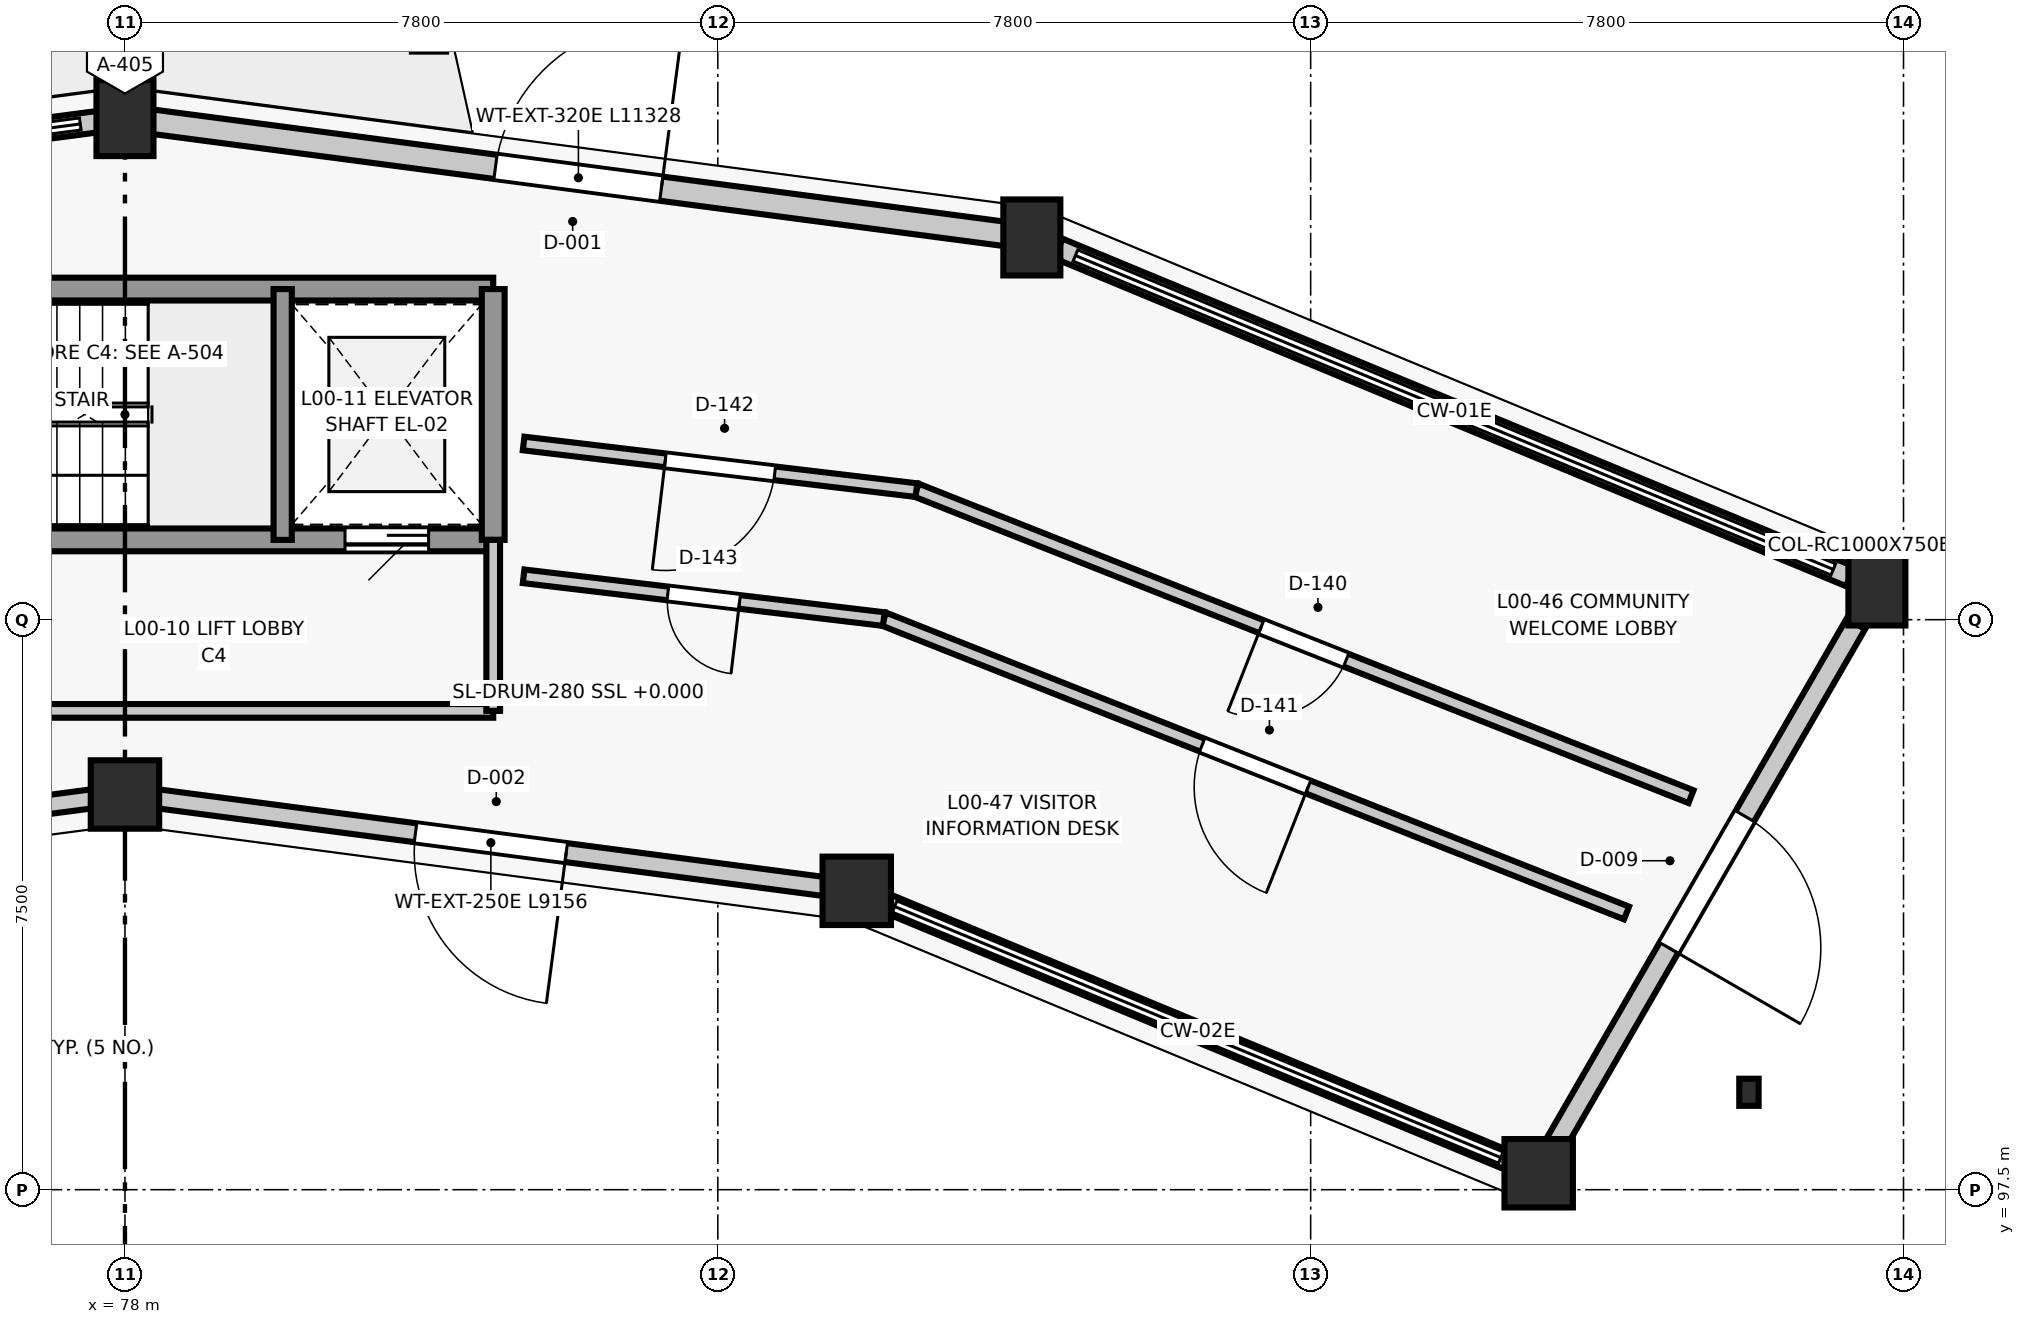
"""IFC4 building model, lengths in metres.
Left out: names, types, materials, properties, quantities, classifications, styles, units other than length and angle.
Written with IfcOpenShell. Run it as: python <this file> out.ifc"""

import sys

from ifc_helpers import new_model, si_unit, direction, frame, frame_2d, origin, origin_2d, place, context, subcontext, project, spatial, rectangle, circle, i_section, extrude, element, fill, save


model = new_model("IFC4")
c1 = context("Model", 3, precision=1e-05, world=origin(), true_north=direction((0.0, 1.0)))
c2 = subcontext(c1, "Body", "Model", "MODEL_VIEW")
j1 = project(units=[si_unit("LENGTHUNIT", "METRE"), si_unit("PLANEANGLEUNIT", "RADIAN")], contexts=[c1])
p1 = place(None, origin())
s1 = spatial("IfcSite", under=j1, at=p1, CompositionType="ELEMENT")
p2 = place(p1, origin())
s2 = spatial("IfcBuilding", under=s1, at=p2, CompositionType="ELEMENT")
p3 = place(p2, origin())
s3 = spatial("IfcBuildingStorey", under=s2, at=p3, CompositionType="ELEMENT", Elevation=0.0)
for number, where, z_axis, x_axis in (
    (1, (96.6, 97.716, 0.0), (0.0, 0.0, 1.0), (1.0, 0.0, 0.0)),
    (2, (87.628, 101.432, 0.0), (0.0, 0.0, 1.0), (1.0, 0.0, 0.0)),
    (3, (78.0, 102.7, 0.0), (0.0, 0.0, 1.0), (1.0, 0.0, 0.0)),
):
    element("IfcColumn", number, at=place(p3, frame(where, z_axis=z_axis, x_axis=x_axis)), inside=s3, PredefinedType="COLUMN", context=c2, shape_type="SweptSolid", body=[
        extrude(circle(Radius=0.45, at=origin_2d()), origin(), (0.0, 0.0, 1.0), 4.5),
    ])
for number, where, z_axis, x_axis in (
    (4, (101.05, 105.424, 0.0), (0.0, 0.0, 1.0), (1.0, 0.0, 0.0)),
    (5, (89.932, 110.029, 0.0), (0.0, 0.0, 1.0), (1.0, 0.0, 0.0)),
    (6, (78.0, 111.6, 0.0), (0.0, 0.0, 1.0), (1.0, 0.0, 0.0)),
):
    element("IfcColumn", number, at=place(p3, frame(where, z_axis=z_axis, x_axis=x_axis)), inside=s3, PredefinedType="COLUMN", context=c2, shape_type="SweptSolid", body=[
        extrude(rectangle(XDim=0.75, YDim=1.0, at=origin_2d()), origin(), (0.0, 0.0, 1.0), 4.5),
    ])
p4 = place(p3, frame((99.366, 98.782, 0.0), z_axis=(0.0, 0.0, 1.0), x_axis=(1.0, 0.0, 0.0)))
e7 = element("IfcColumn", 7, at=p4, inside=s3, PredefinedType="COLUMN", context=c2, shape_type="SweptSolid", body=[
    extrude(i_section(OverallWidth=0.255, OverallDepth=0.357, WebThickness=0.01, FlangeThickness=0.018, FilletRadius=0.015, at=origin_2d()), origin(), (0.0, 0.0, 1.0), 4.5),
])
p5 = place(p3, frame((90.283, 109.883, 0.0), z_axis=(0.0, 0.0, 1.0), x_axis=(0.923883530636, -0.382673779896, 0.0)))
e8 = element("IfcWall", 8, at=p5, inside=s3, PredefinedType="STANDARD", context=c2, shape_type="SweptSolid", body=[
    extrude(rectangle(XDim=11.272, YDim=0.28, at=frame_2d((5.636, 0.0))), origin(), (0.0, 0.0, 1.0), 0.82),
])
p6 = place(p3, frame((96.323, 97.831, 0.0), z_axis=(0.0, 0.0, 1.0), x_axis=(-0.923880324771, 0.382681519675, 0.0)))
e9 = element("IfcWall", 9, at=p6, inside=s3, PredefinedType="STANDARD", context=c2, shape_type="SweptSolid", body=[
    extrude(rectangle(XDim=9.112, YDim=0.25, at=frame_2d((4.556, 0.0))), origin(), (0.0, 0.0, 1.0), 0.82),
])
p7 = place(p3, frame((78.35, 111.554, 0.0), z_axis=(0.0, 0.0, 1.0), x_axis=(0.991443215359, -0.130538694334, 0.0)))
e10 = element("IfcWall", 10, at=p7, inside=s3, PredefinedType="STANDARD", context=c2, shape_type="SweptSolid", body=[
    extrude(rectangle(XDim=11.328, YDim=0.32, at=frame_2d((5.664, 0.0))), origin(), (0.0, 0.0, 1.0), 3.466),
])
p8 = place(p7, frame((4.564, 0.0, 0.0)))
e11 = element("IfcOpeningElement", 11, at=p8, cuts=e10, PredefinedType="OPENING", context=c2, shape_type="SweptSolid", body=[
    extrude(rectangle(XDim=2.2, YDim=2.35, at=frame_2d((1.1, 1.175))), frame((0.0, 0.17, 0.0), z_axis=(0.0, -1.0, 0.0), x_axis=(1.0, 0.0, 0.0)), (0.0, 0.0, 1.0), 0.34),
])
p9 = place(p3, frame((87.353, 101.469, 0.0), z_axis=(0.0, 0.0, 1.0), x_axis=(-0.991441766434, 0.130549698469, 0.0)))
e12 = element("IfcWall", 12, at=p9, inside=s3, PredefinedType="STANDARD", context=c2, shape_type="SweptSolid", body=[
    extrude(rectangle(XDim=9.156, YDim=0.25, at=frame_2d((4.578, 0.0))), origin(), (0.0, 0.0, 1.0), 3.549),
])
p10 = place(p9, frame((3.578, 0.0, 0.0)))
e13 = element("IfcOpeningElement", 13, at=p10, cuts=e12, PredefinedType="OPENING", context=c2, shape_type="SweptSolid", body=[
    extrude(rectangle(XDim=2.0, YDim=2.3, at=frame_2d((1.0, 1.15))), frame((0.0, 0.135, 0.0), z_axis=(0.0, -1.0, 0.0), x_axis=(1.0, 0.0, 0.0)), (0.0, 0.0, 1.0), 0.27),
])
p11 = place(p3, frame((66.419, 110.075, 0.0), z_axis=(0.0, 0.0, 1.0), x_axis=(0.991443215359, 0.130538694334, 0.0)))
e14 = element("IfcWall", 14, at=p11, inside=s3, PredefinedType="STANDARD", context=c2, shape_type="SweptSolid", body=[
    extrude(rectangle(XDim=11.328, YDim=0.28, at=frame_2d((5.664, 0.0))), origin(), (0.0, 0.0, 1.0), 0.82),
])
p12 = place(p3, frame((77.725, 102.664, 0.0), z_axis=(0.0, 0.0, 1.0), x_axis=(-0.991441766434, -0.130549698469, 0.0)))
e15 = element("IfcWall", 15, at=p12, inside=s3, PredefinedType="STANDARD", context=c2, shape_type="SweptSolid", body=[
    extrude(rectangle(XDim=9.156, YDim=0.25, at=frame_2d((4.578, 0.0))), origin(), (0.0, 0.0, 1.0), 3.549),
])
p13 = place(p12, frame((4.128, 0.0, 0.85)))
e16 = element("IfcOpeningElement", 16, at=p13, cuts=e15, PredefinedType="OPENING", context=c2, shape_type="SweptSolid", body=[
    extrude(rectangle(XDim=0.9, YDim=0.9, at=frame_2d((0.45, 0.45))), frame((0.0, 0.135, 0.0), z_axis=(0.0, -1.0, 0.0), x_axis=(1.0, 0.0, 0.0)), (0.0, 0.0, 1.0), 0.27),
])
p14 = place(p3, frame((100.774, 104.946, 0.0), z_axis=(0.0, 0.0, 1.0), x_axis=(-0.499969958057, -0.866042747813, 0.0)))
e17 = element("IfcWall", 17, at=p14, inside=s3, PredefinedType="STANDARD", context=c2, shape_type="SweptSolid", body=[
    extrude(rectangle(XDim=8.026, YDim=0.28, at=frame_2d((4.013, 0.0))), origin(), (0.0, 0.0, 1.0), 3.495),
])
p15 = place(p14, frame((2.923, 0.0, 0.0)))
e18 = element("IfcOpeningElement", 18, at=p15, cuts=e17, PredefinedType="OPENING", context=c2, shape_type="SweptSolid", body=[
    extrude(rectangle(XDim=2.0, YDim=2.3, at=frame_2d((1.0, 1.15))), frame((0.0, 0.15, 0.0), z_axis=(0.0, -1.0, 0.0), x_axis=(1.0, 0.0, 0.0)), (0.0, 0.0, 1.0), 0.3),
])
p16 = place(p3, frame((82.845, 106.05, 0.0), z_axis=(0.0, 0.0, 1.0), x_axis=(-1.0, 0.0, 0.0)))
e19 = element("IfcWall", 19, at=p16, inside=s3, PredefinedType="SHEAR", context=c2, shape_type="SweptSolid", body=[
    extrude(rectangle(XDim=9.69, YDim=0.3, at=frame_2d((4.845, 0.0))), origin(), (0.0, 0.0, 1.0), 4.5),
])
p17 = place(p16, frame((8.17, 0.0, 0.0)))
e20 = element("IfcOpeningElement", 20, at=p17, cuts=e19, PredefinedType="OPENING", context=c2, shape_type="SweptSolid", body=[
    extrude(rectangle(XDim=1.3, YDim=2.15, at=frame_2d((0.65, 1.075))), frame((0.0, 0.16, 0.0), z_axis=(0.0, -1.0, 0.0), x_axis=(1.0, 0.0, 0.0)), (0.0, 0.0, 1.0), 0.32),
])
p18 = place(p16, frame((0.85, 0.0, 0.0)))
e21 = element("IfcOpeningElement", 21, at=p18, cuts=e19, PredefinedType="OPENING", context=c2, shape_type="SweptSolid", body=[
    extrude(rectangle(XDim=1.1, YDim=2.15, at=frame_2d((0.55, 1.075))), frame((0.0, 0.16, 0.0), z_axis=(0.0, -1.0, 0.0), x_axis=(1.0, 0.0, 0.0)), (0.0, 0.0, 1.0), 0.32),
])
p19 = place(p3, frame((73.155, 109.35, 0.0), z_axis=(0.0, 0.0, 1.0), x_axis=(1.0, 0.0, 0.0)))
e22 = element("IfcWall", 22, at=p19, inside=s3, PredefinedType="SHEAR", context=c2, shape_type="SweptSolid", body=[
    extrude(rectangle(XDim=9.69, YDim=0.3, at=frame_2d((4.845, 0.0))), origin(), (0.0, 0.0, 1.0), 4.5),
])
p20 = place(p3, frame((82.845, 109.35, 0.0), z_axis=(0.0, 0.0, 1.0), x_axis=(0.0, -1.0, 0.0)))
e23 = element("IfcWall", 23, at=p20, inside=s3, PredefinedType="SHEAR", context=c2, shape_type="SweptSolid", body=[
    extrude(rectangle(XDim=3.3, YDim=0.3, at=frame_2d((1.65, 0.0))), origin(), (0.0, 0.0, 1.0), 4.5),
])
p21 = place(p3, frame((80.075, 106.05, 0.0), z_axis=(0.0, 0.0, 1.0), x_axis=(0.0, 1.0, 0.0)))
e24 = element("IfcWall", 24, at=p21, inside=s3, PredefinedType="SHEAR", context=c2, shape_type="SweptSolid", body=[
    extrude(rectangle(XDim=3.3, YDim=0.24, at=frame_2d((1.65, 0.0))), origin(), (0.0, 0.0, 1.0), 4.5),
])
p22 = place(p3, frame((73.155, 103.8, 0.0), z_axis=(0.0, 0.0, 1.0), x_axis=(1.0, 0.0, 0.0)))
e25 = element("IfcWall", 25, at=p22, inside=s3, PredefinedType="PARTITIONING", context=c2, shape_type="SweptSolid", body=[
    extrude(rectangle(XDim=9.69, YDim=0.18, at=frame_2d((4.845, 0.0))), origin(), (0.0, 0.0, 1.0), 4.255),
])
p23 = place(p22, frame((1.1, 0.0, 0.0)))
e26 = element("IfcOpeningElement", 26, at=p23, cuts=e25, PredefinedType="OPENING", context=c2, shape_type="SweptSolid", body=[
    extrude(rectangle(XDim=1.5, YDim=2.15, at=frame_2d((0.75, 1.075))), frame((0.0, 0.1, 0.0), z_axis=(0.0, -1.0, 0.0), x_axis=(1.0, 0.0, 0.0)), (0.0, 0.0, 1.0), 0.2),
])
p24 = place(p3, frame((82.845, 106.05, 0.0), z_axis=(0.0, 0.0, 1.0), x_axis=(0.0, -1.0, 0.0)))
e27 = element("IfcWall", 27, at=p24, inside=s3, PredefinedType="PARTITIONING", context=c2, shape_type="SweptSolid", body=[
    extrude(rectangle(XDim=2.25, YDim=0.18, at=frame_2d((1.125, 0.0))), origin(), (0.0, 0.0, 1.0), 4.255),
])
p25 = place(p3, frame((98.604, 102.671, 0.0), z_axis=(0.0, 0.0, 1.0), x_axis=(-0.92984059227, 0.367962597238, 0.0)))
e28 = element("IfcWall", 28, at=p25, inside=s3, PredefinedType="PARTITIONING", context=c2, shape_type="SweptSolid", body=[
    extrude(rectangle(XDim=10.961, YDim=0.18, at=frame_2d((5.48, 0.0))), origin(), (0.0, 0.0, 1.0), 4.255),
])
p26 = place(p25, frame((4.881, 0.0, 0.0)))
e29 = element("IfcOpeningElement", 29, at=p26, cuts=e28, PredefinedType="OPENING", context=c2, shape_type="SweptSolid", body=[
    extrude(rectangle(XDim=1.2, YDim=2.15, at=frame_2d((0.6, 1.075))), frame((0.0, 0.1, 0.0), z_axis=(0.0, -1.0, 0.0), x_axis=(1.0, 0.0, 0.0)), (0.0, 0.0, 1.0), 0.2),
])
p27 = place(p3, frame((97.756, 101.141, 0.0), z_axis=(0.0, 0.0, 1.0), x_axis=(-0.92984171937, 0.367959749046, 0.0)))
e30 = element("IfcWall", 30, at=p27, inside=s3, PredefinedType="PARTITIONING", context=c2, shape_type="SweptSolid", body=[
    extrude(rectangle(XDim=10.51, YDim=0.18, at=frame_2d((5.255, 0.0))), origin(), (0.0, 0.0, 1.0), 4.255),
])
p28 = place(p27, frame((4.505, 0.0, 0.0)))
e31 = element("IfcOpeningElement", 31, at=p28, cuts=e30, PredefinedType="OPENING", context=c2, shape_type="SweptSolid", body=[
    extrude(rectangle(XDim=1.5, YDim=2.15, at=frame_2d((0.75, 1.075))), frame((0.0, 0.1, 0.0), z_axis=(0.0, -1.0, 0.0), x_axis=(1.0, 0.0, 0.0)), (0.0, 0.0, 1.0), 0.2),
])
p29 = place(p3, frame((88.413, 106.705, 0.0), z_axis=(0.0, 0.0, 1.0), x_axis=(-0.993019970185, 0.117946338706, 0.0)))
e32 = element("IfcWall", 32, at=p29, inside=s3, PredefinedType="PARTITIONING", context=c2, shape_type="SweptSolid", body=[
    extrude(rectangle(XDim=5.204, YDim=0.18, at=frame_2d((2.602, 0.0))), origin(), (0.0, 0.0, 1.0), 4.255),
])
p30 = place(p29, frame((1.877, 0.0, 0.0)))
e33 = element("IfcOpeningElement", 33, at=p30, cuts=e32, PredefinedType="OPENING", context=c2, shape_type="SweptSolid", body=[
    extrude(rectangle(XDim=1.45, YDim=2.2, at=frame_2d((0.725, 1.1))), frame((0.0, 0.1, 0.0), z_axis=(0.0, -1.0, 0.0), x_axis=(1.0, 0.0, 0.0)), (0.0, 0.0, 1.0), 0.2),
])
p31 = place(p3, frame((87.984, 105.008, 0.0), z_axis=(0.0, 0.0, 1.0), x_axis=(-0.993021837472, 0.117930616486, 0.0)))
e34 = element("IfcWall", 34, at=p31, inside=s3, PredefinedType="PARTITIONING", context=c2, shape_type="SweptSolid", body=[
    extrude(rectangle(XDim=4.772, YDim=0.18, at=frame_2d((2.386, 0.0))), origin(), (0.0, 0.0, 1.0), 4.255),
])
p32 = place(p31, frame((1.911, 0.0, 0.0)))
e35 = element("IfcOpeningElement", 35, at=p32, cuts=e34, PredefinedType="OPENING", context=c2, shape_type="SweptSolid", body=[
    extrude(rectangle(XDim=0.95, YDim=2.1, at=frame_2d((0.475, 1.05))), frame((0.0, 0.1, 0.0), z_axis=(0.0, -1.0, 0.0), x_axis=(1.0, 0.0, 0.0)), (0.0, 0.0, 1.0), 0.2),
])
p33 = place(p8, origin())
e36 = element("IfcDoor", 36, at=p33, inside=s3, OperationType="SINGLE_SWING_RIGHT", PredefinedType="DOOR", context=c2, shape_type="SweptSolid", body=[
    extrude(rectangle(XDim=2.2, YDim=2.35, at=frame_2d((1.1, 1.175))), frame((0.0, 0.025, 0.0), z_axis=(0.0, -1.0, 0.0), x_axis=(1.0, 0.0, 0.0)), (0.0, 0.0, 1.0), 0.05),
])
fill(e11, e36)
p34 = place(p10, origin())
e37 = element("IfcDoor", 37, at=p34, inside=s3, OperationType="SINGLE_SWING_LEFT", PredefinedType="DOOR", context=c2, shape_type="SweptSolid", body=[
    extrude(rectangle(XDim=2.0, YDim=2.3, at=frame_2d((1.0, 1.15))), frame((0.0, 0.025, 0.0), z_axis=(0.0, -1.0, 0.0), x_axis=(1.0, 0.0, 0.0)), (0.0, 0.0, 1.0), 0.05),
])
fill(e13, e37)
p35 = place(p15, origin())
e38 = element("IfcDoor", 38, at=p35, inside=s3, OperationType="SINGLE_SWING_RIGHT", PredefinedType="DOOR", context=c2, shape_type="SweptSolid", body=[
    extrude(rectangle(XDim=2.0, YDim=2.3, at=frame_2d((1.0, 1.15))), frame((0.0, 0.025, 0.0), z_axis=(0.0, -1.0, 0.0), x_axis=(1.0, 0.0, 0.0)), (0.0, 0.0, 1.0), 0.05),
])
fill(e18, e38)
p36 = place(p18, origin())
e39 = element("IfcDoor", 39, at=p36, inside=s3, OperationType="SLIDING_TO_LEFT", PredefinedType="DOOR", context=c2, shape_type="SweptSolid", body=[
    extrude(rectangle(XDim=1.1, YDim=2.15, at=frame_2d((0.55, 1.075))), frame((0.0, 0.025, 0.0), z_axis=(0.0, -1.0, 0.0), x_axis=(1.0, 0.0, 0.0)), (0.0, 0.0, 1.0), 0.05),
])
fill(e21, e39)
p37 = place(p26, origin())
e40 = element("IfcDoor", 40, at=p37, inside=s3, OperationType="SINGLE_SWING_RIGHT", PredefinedType="DOOR", context=c2, shape_type="SweptSolid", body=[
    extrude(rectangle(XDim=1.2, YDim=2.15, at=frame_2d((0.6, 1.075))), frame((0.0, 0.025, 0.0), z_axis=(0.0, -1.0, 0.0), x_axis=(1.0, 0.0, 0.0)), (0.0, 0.0, 1.0), 0.05),
])
fill(e29, e40)
p38 = place(p28, origin())
e41 = element("IfcDoor", 41, at=p38, inside=s3, OperationType="SINGLE_SWING_LEFT", PredefinedType="DOOR", context=c2, shape_type="SweptSolid", body=[
    extrude(rectangle(XDim=1.5, YDim=2.15, at=frame_2d((0.75, 1.075))), frame((0.0, 0.025, 0.0), z_axis=(0.0, -1.0, 0.0), x_axis=(1.0, 0.0, 0.0)), (0.0, 0.0, 1.0), 0.05),
])
fill(e31, e41)
p39 = place(p30, origin())
e42 = element("IfcDoor", 42, at=p39, inside=s3, OperationType="SINGLE_SWING_RIGHT", PredefinedType="DOOR", context=c2, shape_type="SweptSolid", body=[
    extrude(rectangle(XDim=1.45, YDim=2.2, at=frame_2d((0.725, 1.1))), frame((0.0, 0.025, 0.0), z_axis=(0.0, -1.0, 0.0), x_axis=(1.0, 0.0, 0.0)), (0.0, 0.0, 1.0), 0.05),
])
fill(e33, e42)
p40 = place(p32, origin())
e43 = element("IfcDoor", 43, at=p40, inside=s3, OperationType="SINGLE_SWING_LEFT", PredefinedType="DOOR", context=c2, shape_type="SweptSolid", body=[
    extrude(rectangle(XDim=0.95, YDim=2.1, at=frame_2d((0.475, 1.05))), frame((0.0, 0.025, 0.0), z_axis=(0.0, -1.0, 0.0), x_axis=(1.0, 0.0, 0.0)), (0.0, 0.0, 1.0), 0.05),
])
fill(e35, e43)
save(model, sys.argv[1])
